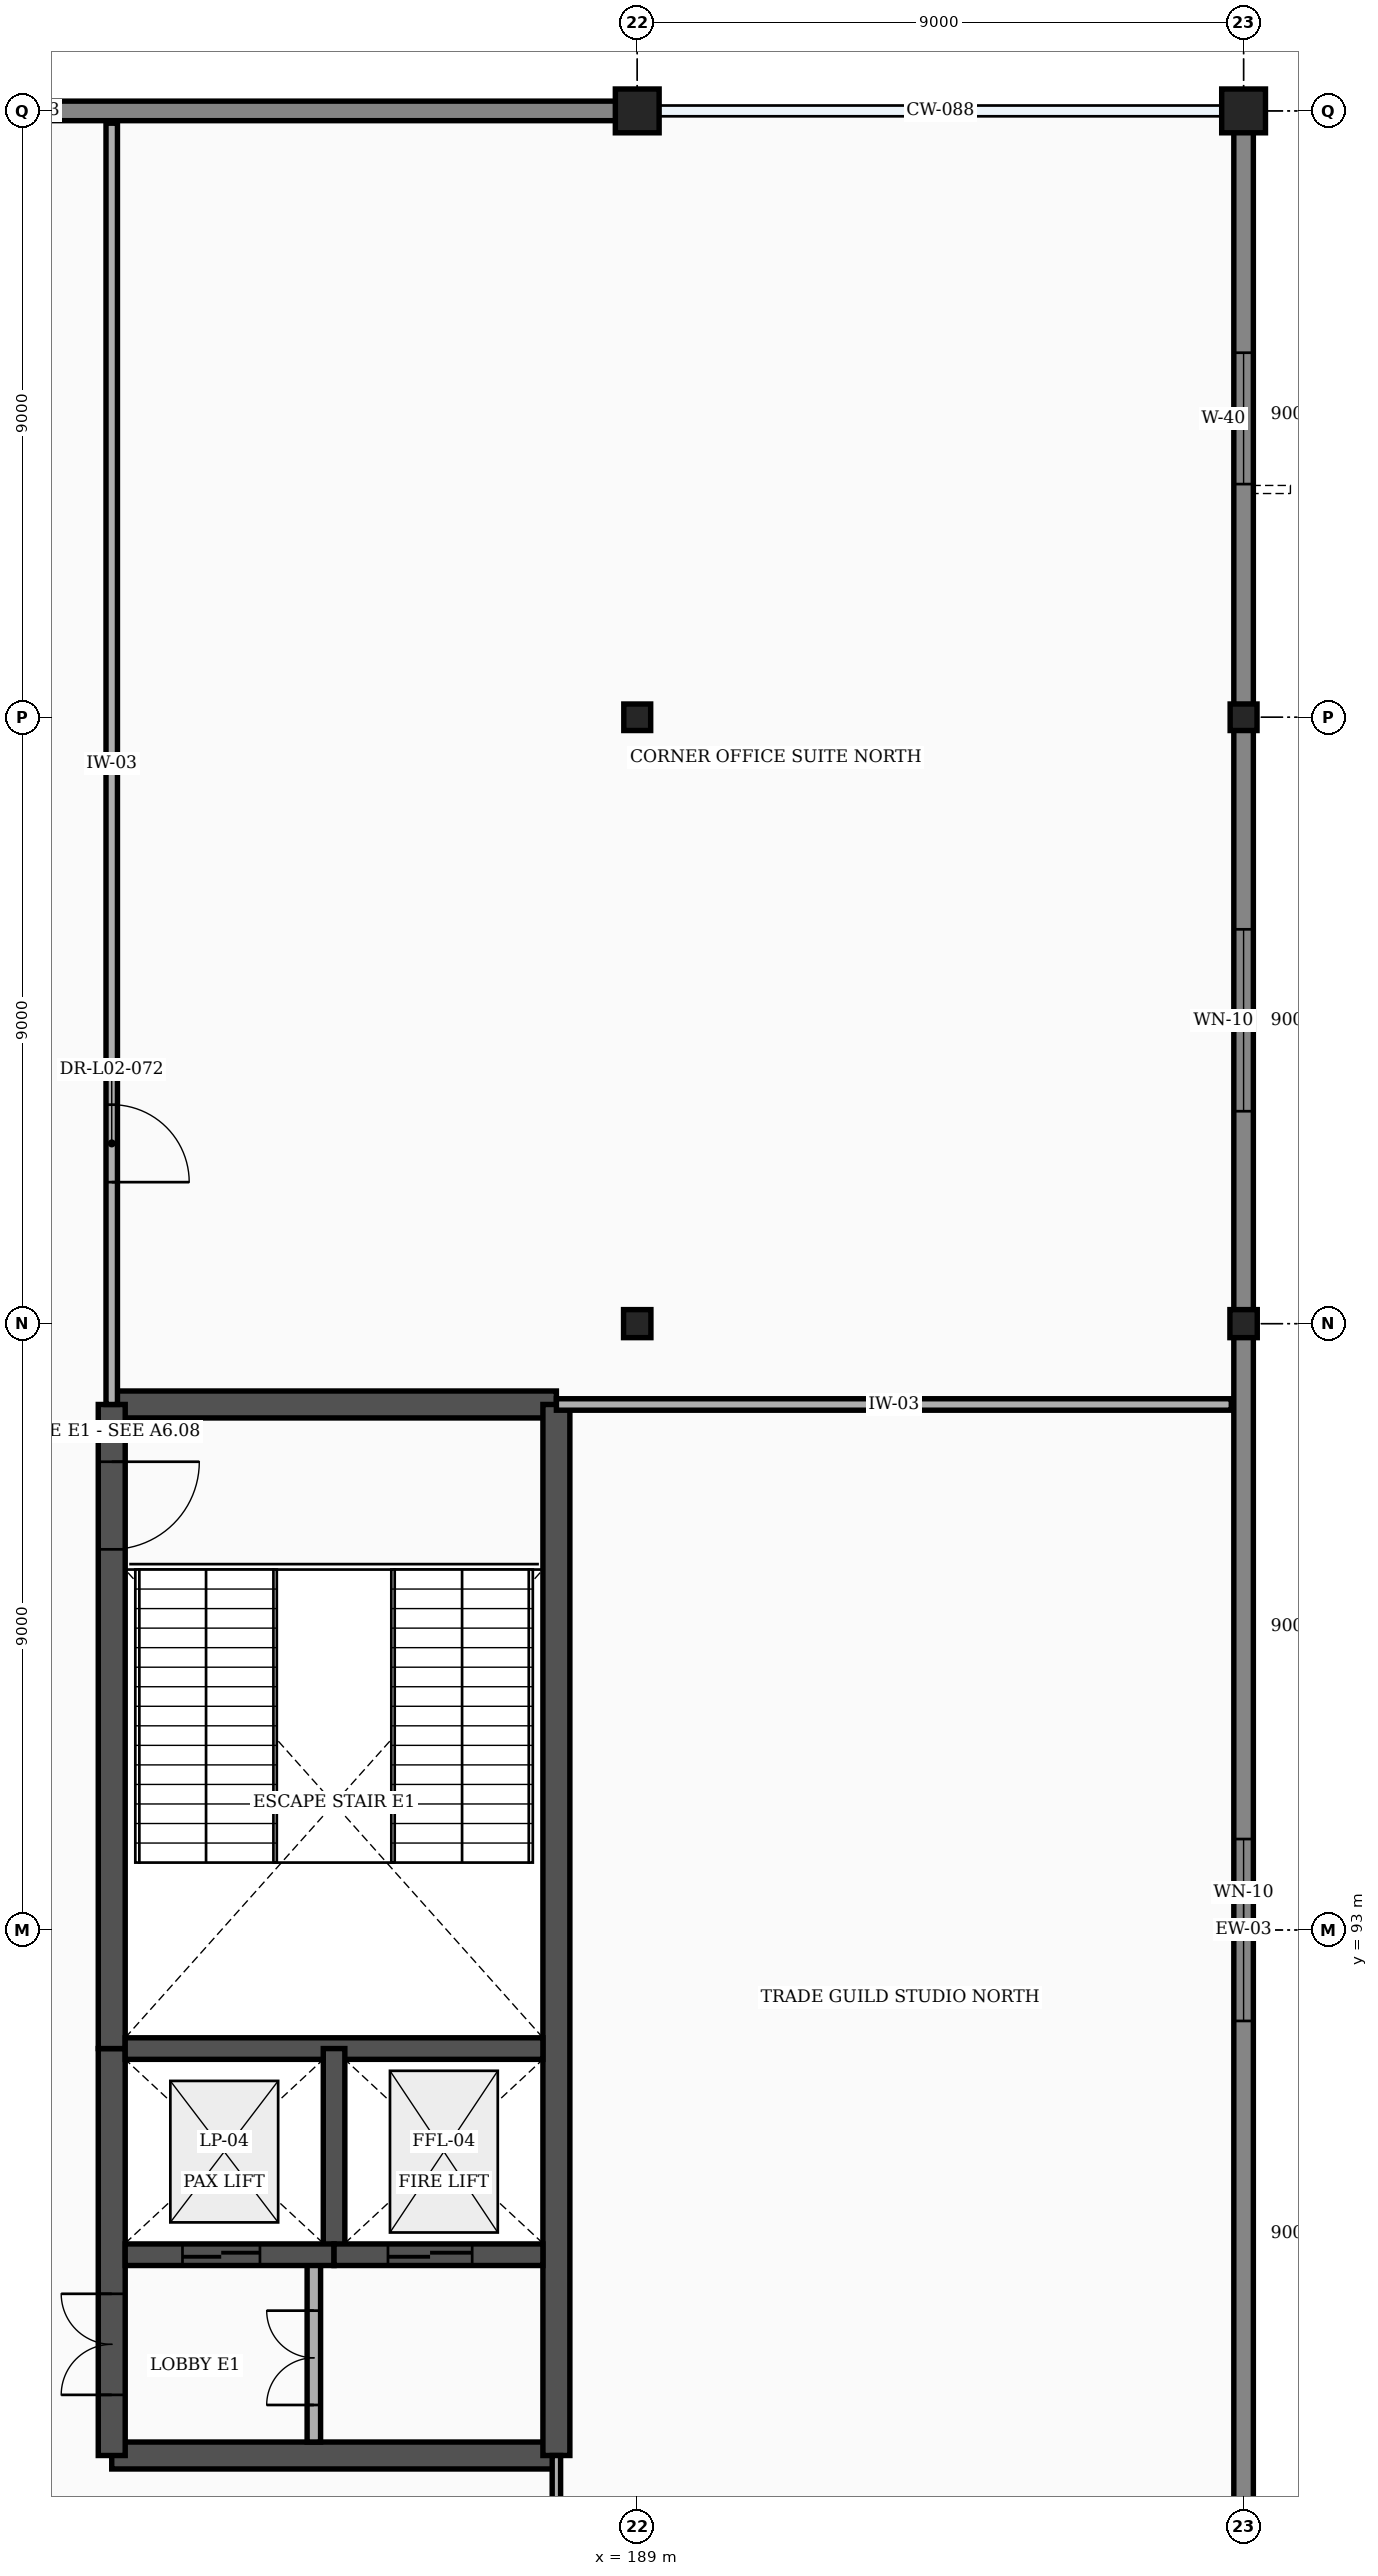
"""IFC4 building model, lengths in metres.
Left out: names, types, materials, properties, quantities, classifications, styles, units other than length and angle.
Written with IfcOpenShell. Run it as: python <this file> out.ifc"""

import sys

from ifc_helpers import new_model, si_unit, direction, frame, frame_2d, origin, origin_2d, place, context, subcontext, project, spatial, rectangle, i_section, extrude, element, fill, save


model = new_model("IFC4")
c1 = context("Model", 3, precision=1e-05, world=origin(), true_north=direction((0.0, 1.0)))
c2 = subcontext(c1, "Body", "Model", "MODEL_VIEW")
j1 = project(units=[si_unit("LENGTHUNIT", "METRE"), si_unit("PLANEANGLEUNIT", "RADIAN")], contexts=[c1])
p1 = place(None, origin())
s1 = spatial("IfcSite", under=j1, at=p1, CompositionType="ELEMENT")
p2 = place(p1, origin())
s2 = spatial("IfcBuilding", under=s1, at=p2, CompositionType="ELEMENT")
p3 = place(p2, frame((0.0, 0.0, 11.4)))
s3 = spatial("IfcBuildingStorey", under=s2, at=p3, CompositionType="ELEMENT", Elevation=11.4)
p4 = place(p3, frame((189.0, 102.0, 0.0), z_axis=(0.0, 0.0, 1.0), x_axis=(1.0, 0.0, 0.0)))
e1 = element("IfcColumn", 1, at=p4, inside=s3, PredefinedType="COLUMN", context=c2, shape_type="SweptSolid", body=[
    extrude(i_section(OverallWidth=0.406, OverallDepth=0.416, WebThickness=0.03, FlangeThickness=0.048, at=origin_2d()), origin(), (0.0, 0.0, 1.0), 5.4),
])
p5 = place(p3, frame((189.0, 111.0, 0.0), z_axis=(0.0, 0.0, 1.0), x_axis=(1.0, 0.0, 0.0)))
e2 = element("IfcColumn", 2, at=p5, inside=s3, PredefinedType="COLUMN", context=c2, shape_type="SweptSolid", body=[
    extrude(i_section(OverallWidth=0.399, OverallDepth=0.394, WebThickness=0.023, FlangeThickness=0.037, at=origin_2d()), origin(), (0.0, 0.0, 1.0), 5.4),
])
p6 = place(p3, frame((189.0, 120.0, 0.0), z_axis=(0.0, 0.0, 1.0), x_axis=(1.0, 0.0, 0.0)))
e3 = element("IfcColumn", 3, at=p6, inside=s3, PredefinedType="COLUMN", context=c2, shape_type="SweptSolid", body=[
    extrude(rectangle(XDim=0.65, YDim=0.65, at=origin_2d()), origin(), (0.0, 0.0, 1.0), 5.4),
])
p7 = place(p3, frame((198.0, 102.0, 0.0), z_axis=(0.0, 0.0, 1.0), x_axis=(1.0, 0.0, 0.0)))
e4 = element("IfcColumn", 4, at=p7, inside=s3, PredefinedType="COLUMN", context=c2, shape_type="SweptSolid", body=[
    extrude(i_section(OverallWidth=0.406, OverallDepth=0.416, WebThickness=0.03, FlangeThickness=0.048, at=origin_2d()), origin(), (0.0, 0.0, 1.0), 5.4),
])
p8 = place(p3, frame((198.0, 111.0, 0.0), z_axis=(0.0, 0.0, 1.0), x_axis=(1.0, 0.0, 0.0)))
e5 = element("IfcColumn", 5, at=p8, inside=s3, PredefinedType="COLUMN", context=c2, shape_type="SweptSolid", body=[
    extrude(i_section(OverallWidth=0.399, OverallDepth=0.394, WebThickness=0.023, FlangeThickness=0.037, at=origin_2d()), origin(), (0.0, 0.0, 1.0), 5.4),
])
p9 = place(p3, frame((198.0, 120.0, 0.0), z_axis=(0.0, 0.0, 1.0), x_axis=(1.0, 0.0, 0.0)))
e6 = element("IfcColumn", 6, at=p9, inside=s3, PredefinedType="COLUMN", context=c2, shape_type="SweptSolid", body=[
    extrude(rectangle(XDim=0.65, YDim=0.65, at=origin_2d()), origin(), (0.0, 0.0, 1.0), 5.4),
])
p10 = place(p3, frame((171.317, 120.0, 0.0), z_axis=(0.0, 0.0, 1.0), x_axis=(1.0, 0.0, 0.0)))
e7 = element("IfcWall", 7, at=p10, inside=s3, PredefinedType="STANDARD", context=c2, shape_type="SweptSolid", body=[
    extrude(rectangle(XDim=17.366, YDim=0.29, at=frame_2d((8.683, 0.0))), origin(), (0.0, 0.0, 1.0), 4.388),
])
p11 = place(p10, frame((0.65, 0.0, 0.85)))
e8 = element("IfcOpeningElement", 8, at=p11, cuts=e7, PredefinedType="OPENING", context=c2, shape_type="SweptSolid", body=[
    extrude(rectangle(XDim=2.7, YDim=2.4, at=frame_2d((1.35, 1.2))), frame((0.0, 0.157, 0.0), z_axis=(0.0, -1.0, 0.0), x_axis=(1.0, 0.0, 0.0)), (0.0, 0.0, 1.0), 0.314),
])
p12 = place(p3, frame((198.0, 84.194, 0.0), z_axis=(0.0, 0.0, 1.0), x_axis=(0.0, 1.0, 0.0)))
e9 = element("IfcWall", 9, at=p12, inside=s3, PredefinedType="STANDARD", context=c2, shape_type="SweptSolid", body=[
    extrude(rectangle(XDim=17.612, YDim=0.29, at=frame_2d((8.806, 0.0))), origin(), (0.0, 0.0, 1.0), 4.467),
])
p13 = place(p12, frame((7.456, 0.0, 0.85)))
e10 = element("IfcOpeningElement", 10, at=p13, cuts=e9, PredefinedType="OPENING", context=c2, shape_type="SweptSolid", body=[
    extrude(rectangle(XDim=2.7, YDim=2.4, at=frame_2d((1.35, 1.2))), frame((0.0, 0.157, 0.0), z_axis=(0.0, -1.0, 0.0), x_axis=(1.0, 0.0, 0.0)), (0.0, 0.0, 1.0), 0.314),
])
p14 = place(p3, frame((198.0, 102.194, 0.0), z_axis=(0.0, 0.0, 1.0), x_axis=(0.0, 1.0, 0.0)))
e11 = element("IfcWall", 11, at=p14, inside=s3, PredefinedType="STANDARD", context=c2, shape_type="SweptSolid", body=[
    extrude(rectangle(XDim=8.617, YDim=0.29, at=frame_2d((4.309, 0.0))), origin(), (0.0, 0.0, 1.0), 4.9),
])
p15 = place(p14, frame((2.959, 0.0, 0.85)))
e12 = element("IfcOpeningElement", 12, at=p15, cuts=e11, PredefinedType="OPENING", context=c2, shape_type="SweptSolid", body=[
    extrude(rectangle(XDim=2.7, YDim=2.4, at=frame_2d((1.35, 1.2))), frame((0.0, 0.157, 0.0), z_axis=(0.0, -1.0, 0.0), x_axis=(1.0, 0.0, 0.0)), (0.0, 0.0, 1.0), 0.314),
])
p16 = place(p3, frame((198.0, 111.189, 0.0), z_axis=(0.0, 0.0, 1.0), x_axis=(0.0, 1.0, 0.0)))
e13 = element("IfcWall", 13, at=p16, inside=s3, PredefinedType="STANDARD", context=c2, shape_type="SweptSolid", body=[
    extrude(rectangle(XDim=8.494, YDim=0.29, at=frame_2d((4.247, 0.0))), origin(), (0.0, 0.0, 1.0), 4.9),
])
p17 = place(p16, frame((3.272, 0.0, 0.85)))
e14 = element("IfcOpeningElement", 14, at=p17, cuts=e13, PredefinedType="OPENING", context=c2, shape_type="SweptSolid", body=[
    extrude(rectangle(XDim=1.95, YDim=2.2, at=frame_2d((0.975, 1.1))), frame((0.0, 0.157, 0.0), z_axis=(0.0, -1.0, 0.0), x_axis=(1.0, 0.0, 0.0)), (0.0, 0.0, 1.0), 0.314),
])
for number, where, z_axis, x_axis in (
    (15, (181.2, 85.2, 0.0), (0.0, 0.0, 1.0), (1.0, 0.0, 0.0)),
    (16, (181.2, 100.8, 0.0), (0.0, 0.0, 1.0), (1.0, 0.0, 0.0)),
):
    element("IfcWall", number, at=place(p3, frame(where, z_axis=z_axis, x_axis=x_axis)), inside=s3, PredefinedType="SHEAR", context=c2, shape_type="SweptSolid", body=[
        extrude(rectangle(XDim=6.6, YDim=0.4, at=frame_2d((3.3, 0.0))), origin(), (0.0, 0.0, 1.0), 5.15),
    ])
p18 = place(p3, frame((187.8, 85.2, 0.0), z_axis=(0.0, 0.0, 1.0), x_axis=(0.0, 1.0, 0.0)))
e17 = element("IfcWall", 17, at=p18, inside=s3, PredefinedType="SHEAR", context=c2, shape_type="SweptSolid", body=[
    extrude(rectangle(XDim=15.6, YDim=0.4, at=frame_2d((7.8, 0.0))), origin(), (0.0, 0.0, 1.0), 5.15),
])
p19 = place(p3, frame((181.2, 85.2, 0.0), z_axis=(0.0, 0.0, 1.0), x_axis=(0.0, 1.0, 0.0)))
e18 = element("IfcWall", 18, at=p19, inside=s3, PredefinedType="SHEAR", context=c2, shape_type="SweptSolid", body=[
    extrude(rectangle(XDim=6.04, YDim=0.4, at=frame_2d((3.02, 0.0))), origin(), (0.0, 0.0, 1.0), 5.15),
])
p20 = place(p19, frame((0.9, 0.0, 0.0)))
e19 = element("IfcOpeningElement", 19, at=p20, cuts=e18, PredefinedType="OPENING", context=c2, shape_type="SweptSolid", body=[
    extrude(rectangle(XDim=1.5, YDim=2.2, at=frame_2d((0.75, 1.1))), frame((0.0, 0.212, 0.0), z_axis=(0.0, -1.0, 0.0), x_axis=(1.0, 0.0, 0.0)), (0.0, 0.0, 1.0), 0.424),
])
p21 = place(p3, frame((181.2, 91.24, 0.0), z_axis=(0.0, 0.0, 1.0), x_axis=(0.0, 1.0, 0.0)))
e20 = element("IfcWall", 20, at=p21, inside=s3, PredefinedType="SHEAR", context=c2, shape_type="SweptSolid", body=[
    extrude(rectangle(XDim=9.56, YDim=0.4, at=frame_2d((4.78, 0.0))), origin(), (0.0, 0.0, 1.0), 5.15),
])
p22 = place(p21, frame((7.41, 0.0, 0.0)))
e21 = element("IfcOpeningElement", 21, at=p22, cuts=e20, PredefinedType="OPENING", context=c2, shape_type="SweptSolid", body=[
    extrude(rectangle(XDim=1.3, YDim=2.2, at=frame_2d((0.65, 1.1))), frame((0.0, 0.212, 0.0), z_axis=(0.0, -1.0, 0.0), x_axis=(1.0, 0.0, 0.0)), (0.0, 0.0, 1.0), 0.424),
])
p23 = place(p3, frame((181.4, 91.24, 0.0), z_axis=(0.0, 0.0, 1.0), x_axis=(1.0, 0.0, 0.0)))
e22 = element("IfcWall", 22, at=p23, inside=s3, PredefinedType="SHEAR", context=c2, shape_type="SweptSolid", body=[
    extrude(rectangle(XDim=6.2, YDim=0.32, at=frame_2d((3.1, 0.0))), origin(), (0.0, 0.0, 1.0), 5.15),
])
p24 = place(p3, frame((184.5, 88.18, 0.0), z_axis=(0.0, 0.0, 1.0), x_axis=(0.0, 1.0, 0.0)))
e23 = element("IfcWall", 23, at=p24, inside=s3, PredefinedType="SHEAR", context=c2, shape_type="SweptSolid", body=[
    extrude(rectangle(XDim=3.06, YDim=0.32, at=frame_2d((1.53, 0.0))), origin(), (0.0, 0.0, 1.0), 5.15),
])
p25 = place(p3, frame((184.2, 85.4, 0.0), z_axis=(0.0, 0.0, 1.0), x_axis=(0.0, 1.0, 0.0)))
e24 = element("IfcWall", 24, at=p25, inside=s3, PredefinedType="PARTITIONING", context=c2, shape_type="SweptSolid", body=[
    extrude(rectangle(XDim=2.78, YDim=0.2, at=frame_2d((1.39, 0.0))), origin(), (0.0, 0.0, 1.0), 5.15),
])
p26 = place(p25, frame((0.55, 0.0, 0.0)))
e25 = element("IfcOpeningElement", 25, at=p26, cuts=e24, PredefinedType="OPENING", context=c2, shape_type="SweptSolid", body=[
    extrude(rectangle(XDim=1.4, YDim=2.25, at=frame_2d((0.7, 1.125))), frame((0.0, 0.112, 0.0), z_axis=(0.0, -1.0, 0.0), x_axis=(1.0, 0.0, 0.0)), (0.0, 0.0, 1.0), 0.224),
])
p27 = place(p3, frame((181.4, 88.18, 0.0), z_axis=(0.0, 0.0, 1.0), x_axis=(1.0, 0.0, 0.0)))
e26 = element("IfcWall", 26, at=p27, inside=s3, PredefinedType="SHEAR", context=c2, shape_type="SweptSolid", body=[
    extrude(rectangle(XDim=3.1, YDim=0.32, at=frame_2d((1.55, 0.0))), origin(), (0.0, 0.0, 1.0), 5.15),
])
p28 = place(p27, frame((0.85, 0.0, 0.0)))
e27 = element("IfcOpeningElement", 27, at=p28, cuts=e26, PredefinedType="OPENING", context=c2, shape_type="SweptSolid", body=[
    extrude(rectangle(XDim=1.15, YDim=2.2, at=frame_2d((0.575, 1.1))), frame((0.0, 0.172, 0.0), z_axis=(0.0, -1.0, 0.0), x_axis=(1.0, 0.0, 0.0)), (0.0, 0.0, 1.0), 0.344),
])
p29 = place(p3, frame((184.5, 88.18, 0.0), z_axis=(0.0, 0.0, 1.0), x_axis=(1.0, 0.0, 0.0)))
e28 = element("IfcWall", 28, at=p29, inside=s3, PredefinedType="SHEAR", context=c2, shape_type="SweptSolid", body=[
    extrude(rectangle(XDim=3.1, YDim=0.32, at=frame_2d((1.55, 0.0))), origin(), (0.0, 0.0, 1.0), 5.15),
])
p30 = place(p29, frame((0.8, 0.0, 0.0)))
e29 = element("IfcOpeningElement", 29, at=p30, cuts=e28, PredefinedType="OPENING", context=c2, shape_type="SweptSolid", body=[
    extrude(rectangle(XDim=1.25, YDim=2.25, at=frame_2d((0.625, 1.125))), frame((0.0, 0.172, 0.0), z_axis=(0.0, -1.0, 0.0), x_axis=(1.0, 0.0, 0.0)), (0.0, 0.0, 1.0), 0.344),
])
p31 = place(p3, frame((187.8, 83.2, 0.0), z_axis=(0.0, 0.0, 1.0), x_axis=(0.0, 1.0, 0.0)))
e30 = element("IfcWall", 30, at=p31, inside=s3, PredefinedType="PARTITIONING", context=c2, shape_type="SweptSolid", body=[
    extrude(rectangle(XDim=2.0, YDim=0.125, at=frame_2d((1.0, 0.0))), origin(), (0.0, 0.0, 1.0), 5.15),
])
p32 = place(p3, frame((187.8, 100.8, 0.0), z_axis=(0.0, 0.0, 1.0), x_axis=(1.0, 0.0, 0.0)))
e31 = element("IfcWall", 31, at=p32, inside=s3, PredefinedType="PARTITIONING", context=c2, shape_type="SweptSolid", body=[
    extrude(rectangle(XDim=10.017, YDim=0.17, at=frame_2d((5.009, 0.0))), origin(), (0.0, 0.0, 1.0), 5.15),
])
p33 = place(p3, frame((181.2, 100.8, 0.0), z_axis=(0.0, 0.0, 1.0), x_axis=(0.0, 1.0, 0.0)))
e32 = element("IfcWall", 32, at=p33, inside=s3, PredefinedType="PARTITIONING", context=c2, shape_type="SweptSolid", body=[
    extrude(rectangle(XDim=19.017, YDim=0.17, at=frame_2d((9.509, 0.0))), origin(), (0.0, 0.0, 1.0), 5.15),
])
p34 = place(p33, frame((3.3, 0.0, 0.0)))
e33 = element("IfcOpeningElement", 33, at=p34, cuts=e32, PredefinedType="OPENING", context=c2, shape_type="SweptSolid", body=[
    extrude(rectangle(XDim=1.15, YDim=2.15, at=frame_2d((0.575, 1.075))), frame((0.0, 0.097, 0.0), z_axis=(0.0, -1.0, 0.0), x_axis=(1.0, 0.0, 0.0)), (0.0, 0.0, 1.0), 0.194),
])
p35 = place(p13, origin())
e34 = element("IfcWindow", 34, at=p35, inside=s3, PartitioningType="SINGLE_PANEL", PredefinedType="WINDOW", context=c2, shape_type="SweptSolid", body=[
    extrude(rectangle(XDim=2.7, YDim=2.4, at=frame_2d((1.35, 1.2))), frame((0.0, 0.03, 0.0), z_axis=(0.0, -1.0, 0.0), x_axis=(1.0, 0.0, 0.0)), (0.0, 0.0, 1.0), 0.06),
])
fill(e10, e34)
p36 = place(p15, origin())
e35 = element("IfcWindow", 35, at=p36, inside=s3, PartitioningType="SINGLE_PANEL", PredefinedType="WINDOW", context=c2, shape_type="SweptSolid", body=[
    extrude(rectangle(XDim=2.7, YDim=2.4, at=frame_2d((1.35, 1.2))), frame((0.0, 0.03, 0.0), z_axis=(0.0, -1.0, 0.0), x_axis=(1.0, 0.0, 0.0)), (0.0, 0.0, 1.0), 0.06),
])
fill(e12, e35)
p37 = place(p17, origin())
e36 = element("IfcWindow", 36, at=p37, inside=s3, PartitioningType="SINGLE_PANEL", PredefinedType="WINDOW", context=c2, shape_type="SweptSolid", body=[
    extrude(rectangle(XDim=1.95, YDim=2.2, at=frame_2d((0.975, 1.1))), frame((0.0, 0.03, 0.0), z_axis=(0.0, -1.0, 0.0), x_axis=(1.0, 0.0, 0.0)), (0.0, 0.0, 1.0), 0.06),
])
fill(e14, e36)
p38 = place(p20, origin())
e37 = element("IfcDoor", 37, at=p38, inside=s3, OperationType="DOUBLE_DOOR_SINGLE_SWING", PredefinedType="DOOR", context=c2, shape_type="SweptSolid", body=[
    extrude(rectangle(XDim=1.5, YDim=2.2, at=frame_2d((0.75, 1.1))), frame((0.0, 0.025, 0.0), z_axis=(0.0, -1.0, 0.0), x_axis=(1.0, 0.0, 0.0)), (0.0, 0.0, 1.0), 0.05),
])
fill(e19, e37)
p39 = place(p22, frame((1.3, 0.0, 0.0), z_axis=(0.0, 0.0, 1.0), x_axis=(-1.0, 0.0, 0.0)))
e38 = element("IfcDoor", 38, at=p39, inside=s3, OperationType="SINGLE_SWING_LEFT", PredefinedType="DOOR", context=c2, shape_type="SweptSolid", body=[
    extrude(rectangle(XDim=1.3, YDim=2.2, at=frame_2d((0.65, 1.1))), frame((0.0, 0.025, 0.0), z_axis=(0.0, -1.0, 0.0), x_axis=(1.0, 0.0, 0.0)), (0.0, 0.0, 1.0), 0.05),
])
fill(e21, e38)
p40 = place(p26, origin())
e39 = element("IfcDoor", 39, at=p40, inside=s3, OperationType="DOUBLE_DOOR_SINGLE_SWING", PredefinedType="DOOR", context=c2, shape_type="SweptSolid", body=[
    extrude(rectangle(XDim=1.4, YDim=2.25, at=frame_2d((0.7, 1.125))), frame((0.0, 0.025, 0.0), z_axis=(0.0, -1.0, 0.0), x_axis=(1.0, 0.0, 0.0)), (0.0, 0.0, 1.0), 0.05),
])
fill(e25, e39)
p41 = place(p28, origin())
e40 = element("IfcDoor", 40, at=p41, inside=s3, OperationType="DOUBLE_DOOR_SLIDING", PredefinedType="DOOR", context=c2, shape_type="SweptSolid", body=[
    extrude(rectangle(XDim=1.15, YDim=2.2, at=frame_2d((0.575, 1.1))), frame((0.0, 0.025, 0.0), z_axis=(0.0, -1.0, 0.0), x_axis=(1.0, 0.0, 0.0)), (0.0, 0.0, 1.0), 0.05),
])
fill(e27, e40)
p42 = place(p30, origin())
e41 = element("IfcDoor", 41, at=p42, inside=s3, OperationType="DOUBLE_DOOR_SLIDING", PredefinedType="DOOR", context=c2, shape_type="SweptSolid", body=[
    extrude(rectangle(XDim=1.25, YDim=2.25, at=frame_2d((0.625, 1.125))), frame((0.0, 0.025, 0.0), z_axis=(0.0, -1.0, 0.0), x_axis=(1.0, 0.0, 0.0)), (0.0, 0.0, 1.0), 0.05),
])
fill(e29, e41)
p43 = place(p34, frame((1.15, 0.0, 0.0), z_axis=(0.0, 0.0, 1.0), x_axis=(-1.0, 0.0, 0.0)))
e42 = element("IfcDoor", 42, at=p43, inside=s3, OperationType="SINGLE_SWING_RIGHT", PredefinedType="DOOR", context=c2, shape_type="SweptSolid", body=[
    extrude(rectangle(XDim=1.15, YDim=2.15, at=frame_2d((0.575, 1.075))), frame((0.0, 0.025, 0.0), z_axis=(0.0, -1.0, 0.0), x_axis=(1.0, 0.0, 0.0)), (0.0, 0.0, 1.0), 0.05),
])
fill(e33, e42)
save(model, sys.argv[1])
